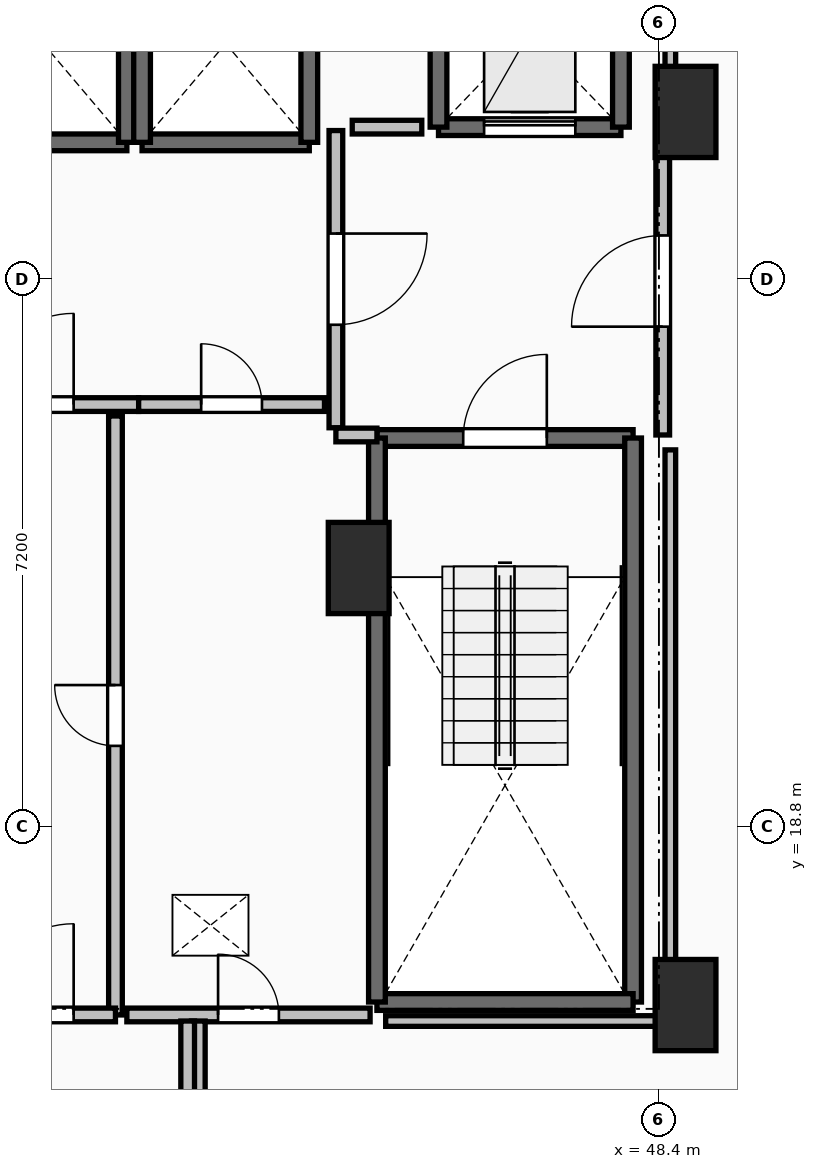
"""IFC4 building model, lengths in metres.
Left out: names, types, materials, properties, quantities, classifications, styles, units other than length and angle.
Written with IfcOpenShell. Run it as: python <this file> out.ifc"""

import sys

from ifc_helpers import new_model, si_unit, direction, frame, frame_2d, origin, origin_2d, place, context, subcontext, project, spatial, rectangle, extrude, element, fill, save


model = new_model("IFC4")
c1 = context("Model", 3, precision=1e-05, world=origin(), true_north=direction((0.0, 1.0)))
c2 = subcontext(c1, "Body", "Model", "MODEL_VIEW")
j1 = project(units=[si_unit("LENGTHUNIT", "METRE"), si_unit("PLANEANGLEUNIT", "RADIAN")], contexts=[c1])
p1 = place(None, origin())
s1 = spatial("IfcSite", under=j1, at=p1, CompositionType="ELEMENT")
p2 = place(p1, origin())
s2 = spatial("IfcBuilding", under=s1, at=p2, CompositionType="ELEMENT")
p3 = place(p2, frame((0.0, 0.0, 59.0)))
s3 = spatial("IfcBuildingStorey", under=s2, at=p3, CompositionType="ELEMENT", Elevation=59.0)
for number, where, z_axis, x_axis in (
    (1, (48.75, 28.2, 0.0), (0.0, 0.0, 1.0), (1.0, 0.0, 0.0)),
    (2, (48.75, 16.45, 0.0), (0.0, 0.0, 1.0), (1.0, 0.0, 0.0)),
    (3, (44.45, 22.2, 0.0), (0.0, 0.0, 1.0), (1.0, 0.0, 0.0)),
):
    element("IfcColumn", number, at=place(p3, frame(where, z_axis=z_axis, x_axis=x_axis)), inside=s3, PredefinedType="PILASTER", context=c2, shape_type="SweptSolid", body=[
        extrude(rectangle(XDim=0.8, YDim=1.2, at=origin_2d()), origin(), (0.0, 0.0, 1.0), 3.5),
    ])
p4 = place(p3, frame((44.69, 23.91, 0.0), z_axis=(0.0, 0.0, 1.0), x_axis=(1.0, 0.0, 0.0)))
e4 = element("IfcWall", 4, at=p4, inside=s3, PredefinedType="SOLIDWALL", context=c2, shape_type="SweptSolid", body=[
    extrude(rectangle(XDim=3.37, YDim=0.22, at=frame_2d((1.685, 0.0))), origin(), (0.0, 0.0, 1.0), 3.24),
])
p5 = place(p4, frame((1.135, 0.0, 0.0)))
e5 = element("IfcOpeningElement", 5, at=p5, cuts=e4, PredefinedType="OPENING", context=c2, shape_type="SweptSolid", body=[
    extrude(rectangle(XDim=1.1, YDim=2.15, at=frame_2d((0.55, 1.075))), frame((0.0, 0.125, 0.0), z_axis=(0.0, -1.0, 0.0), x_axis=(1.0, 0.0, 0.0)), (0.0, 0.0, 1.0), 0.25),
])
p6 = place(p3, frame((48.06, 23.91, 0.0), z_axis=(0.0, 0.0, 1.0), x_axis=(0.0, -1.0, 0.0)))
e6 = element("IfcWall", 6, at=p6, inside=s3, PredefinedType="SOLIDWALL", context=c2, shape_type="SweptSolid", body=[
    extrude(rectangle(XDim=7.42, YDim=0.22, at=frame_2d((3.71, 0.0))), origin(), (0.0, 0.0, 1.0), 3.24),
])
p7 = place(p3, frame((48.06, 16.49, 0.0), z_axis=(0.0, 0.0, 1.0), x_axis=(-1.0, 0.0, 0.0)))
e7 = element("IfcWall", 7, at=p7, inside=s3, PredefinedType="SOLIDWALL", context=c2, shape_type="SweptSolid", body=[
    extrude(rectangle(XDim=3.37, YDim=0.22, at=frame_2d((1.685, 0.0))), origin(), (0.0, 0.0, 1.0), 3.24),
])
p8 = place(p3, frame((44.69, 16.49, 0.0), z_axis=(0.0, 0.0, 1.0), x_axis=(0.0, 1.0, 0.0)))
e8 = element("IfcWall", 8, at=p8, inside=s3, PredefinedType="SOLIDWALL", context=c2, shape_type="SweptSolid", body=[
    extrude(rectangle(XDim=7.42, YDim=0.22, at=frame_2d((3.71, 0.0))), origin(), (0.0, 0.0, 1.0), 3.24),
])
p9 = place(p3, frame((39.2, 27.8, 0.0), z_axis=(0.0, 0.0, 1.0), x_axis=(1.0, 0.0, 0.0)))
e9 = element("IfcWall", 9, at=p9, inside=s3, PredefinedType="SOLIDWALL", context=c2, shape_type="SweptSolid", body=[
    extrude(rectangle(XDim=2.2, YDim=0.22, at=frame_2d((1.1, 0.0))), origin(), (0.0, 0.0, 1.0), 3.24),
])
p10 = place(p3, frame((41.4, 27.8, 0.0), z_axis=(0.0, 0.0, 1.0), x_axis=(0.0, 1.0, 0.0)))
e10 = element("IfcWall", 10, at=p10, inside=s3, PredefinedType="SOLIDWALL", context=c2, shape_type="SweptSolid", body=[
    extrude(rectangle(XDim=2.6, YDim=0.22, at=frame_2d((1.3, 0.0))), origin(), (0.0, 0.0, 1.0), 3.24),
])
p11 = place(p3, frame((41.6, 27.8, 0.0), z_axis=(0.0, 0.0, 1.0), x_axis=(1.0, 0.0, 0.0)))
e11 = element("IfcWall", 11, at=p11, inside=s3, PredefinedType="SOLIDWALL", context=c2, shape_type="SweptSolid", body=[
    extrude(rectangle(XDim=2.2, YDim=0.22, at=frame_2d((1.1, 0.0))), origin(), (0.0, 0.0, 1.0), 3.24),
])
for number, where, z_axis, x_axis in (
    (12, (43.8, 27.8, 0.0), (0.0, 0.0, 1.0), (0.0, 1.0, 0.0)),
    (13, (41.6, 30.4, 0.0), (0.0, 0.0, 1.0), (0.0, -1.0, 0.0)),
):
    element("IfcWall", number, at=place(p3, frame(where, z_axis=z_axis, x_axis=x_axis)), inside=s3, PredefinedType="SOLIDWALL", context=c2, shape_type="SweptSolid", body=[
        extrude(rectangle(XDim=2.6, YDim=0.22, at=frame_2d((1.3, 0.0))), origin(), (0.0, 0.0, 1.0), 3.24),
    ])
p12 = place(p3, frame((45.5, 28.0, 0.0), z_axis=(0.0, 0.0, 1.0), x_axis=(1.0, 0.0, 0.0)))
e14 = element("IfcWall", 14, at=p12, inside=s3, PredefinedType="SHEAR", context=c2, shape_type="SweptSolid", body=[
    extrude(rectangle(XDim=2.4, YDim=0.22, at=frame_2d((1.2, 0.0))), origin(), (0.0, 0.0, 1.0), 3.24),
])
p13 = place(p12, frame((0.6, 0.0, 0.0)))
e15 = element("IfcOpeningElement", 15, at=p13, cuts=e14, PredefinedType="OPENING", context=c2, shape_type="SweptSolid", body=[
    extrude(rectangle(XDim=1.2, YDim=2.2, at=frame_2d((0.6, 1.1))), frame((0.0, 0.125, 0.0), z_axis=(0.0, -1.0, 0.0), x_axis=(1.0, 0.0, 0.0)), (0.0, 0.0, 1.0), 0.25),
])
for number, where, z_axis, x_axis in (
    (16, (47.9, 28.0, 0.0), (0.0, 0.0, 1.0), (0.0, 1.0, 0.0)),
    (17, (45.5, 30.5, 0.0), (0.0, 0.0, 1.0), (0.0, -1.0, 0.0)),
):
    element("IfcWall", number, at=place(p3, frame(where, z_axis=z_axis, x_axis=x_axis)), inside=s3, PredefinedType="SHEAR", context=c2, shape_type="SweptSolid", body=[
        extrude(rectangle(XDim=2.5, YDim=0.22, at=frame_2d((1.25, 0.0))), origin(), (0.0, 0.0, 1.0), 3.24),
    ])
p14 = place(p3, frame((44.15, 27.955, 0.0), z_axis=(0.0, 0.0, 1.0), x_axis=(0.0, -1.0, 0.0)))
e18 = element("IfcWall", 18, at=p14, inside=s3, PredefinedType="PARTITIONING", context=c2, shape_type="SweptSolid", body=[
    extrude(rectangle(XDim=3.91, YDim=0.18, at=frame_2d((1.955, 0.0))), origin(), (0.0, 0.0, 1.0), 3.24),
])
p15 = place(p14, frame((1.355, 0.0, 0.0)))
e19 = element("IfcOpeningElement", 19, at=p15, cuts=e18, PredefinedType="OPENING", context=c2, shape_type="SweptSolid", body=[
    extrude(rectangle(XDim=1.2, YDim=2.15, at=frame_2d((0.6, 1.075))), frame((0.0, 0.105, 0.0), z_axis=(0.0, -1.0, 0.0), x_axis=(1.0, 0.0, 0.0)), (0.0, 0.0, 1.0), 0.21),
])
p16 = place(p3, frame((44.15, 23.95, 0.0), z_axis=(0.0, 0.0, 1.0), x_axis=(1.0, 0.0, 0.0)))
e20 = element("IfcWall", 20, at=p16, inside=s3, PredefinedType="PARTITIONING", context=c2, shape_type="SweptSolid", body=[
    extrude(rectangle(XDim=0.54, YDim=0.18, at=frame_2d((0.27, 0.0))), origin(), (0.0, 0.0, 1.0), 3.24),
])
p17 = place(p3, frame((48.45, 23.95, 0.0), z_axis=(0.0, 0.0, 1.0), x_axis=(0.0, 1.0, 0.0)))
e21 = element("IfcWall", 21, at=p17, inside=s3, PredefinedType="PARTITIONING", context=c2, shape_type="SweptSolid", body=[
    extrude(rectangle(XDim=4.05, YDim=0.18, at=frame_2d((2.025, 0.0))), origin(), (0.0, 0.0, 1.0), 3.24),
])
p18 = place(p17, frame((1.425, 0.0, 0.0)))
e22 = element("IfcOpeningElement", 22, at=p18, cuts=e21, PredefinedType="OPENING", context=c2, shape_type="SweptSolid", body=[
    extrude(rectangle(XDim=1.2, YDim=2.15, at=frame_2d((0.6, 1.075))), frame((0.0, 0.105, 0.0), z_axis=(0.0, -1.0, 0.0), x_axis=(1.0, 0.0, 0.0)), (0.0, 0.0, 1.0), 0.21),
])
p19 = place(p3, frame((38.645, 24.35, 0.0), z_axis=(0.0, 0.0, 1.0), x_axis=(1.0, 0.0, 0.0)))
e23 = element("IfcWall", 23, at=p19, inside=s3, PredefinedType="PARTITIONING", context=c2, shape_type="SweptSolid", body=[
    extrude(rectangle(XDim=2.91, YDim=0.18, at=frame_2d((1.455, 0.0))), origin(), (0.0, 0.0, 1.0), 3.24),
])
p20 = place(p19, frame((0.855, 0.0, 0.0)))
e24 = element("IfcOpeningElement", 24, at=p20, cuts=e23, PredefinedType="OPENING", context=c2, shape_type="SweptSolid", body=[
    extrude(rectangle(XDim=1.2, YDim=2.15, at=frame_2d((0.6, 1.075))), frame((0.0, 0.105, 0.0), z_axis=(0.0, -1.0, 0.0), x_axis=(1.0, 0.0, 0.0)), (0.0, 0.0, 1.0), 0.21),
])
p21 = place(p3, frame((41.555, 24.35, 0.0), z_axis=(0.0, 0.0, 1.0), x_axis=(1.0, 0.0, 0.0)))
e25 = element("IfcWall", 25, at=p21, inside=s3, PredefinedType="PARTITIONING", context=c2, shape_type="SweptSolid", body=[
    extrude(rectangle(XDim=2.445, YDim=0.18, at=frame_2d((1.223, 0.0))), origin(), (0.0, 0.0, 1.0), 3.24),
])
p22 = place(p21, frame((0.823, 0.0, 0.0)))
e26 = element("IfcOpeningElement", 26, at=p22, cuts=e25, PredefinedType="OPENING", context=c2, shape_type="SweptSolid", body=[
    extrude(rectangle(XDim=0.8, YDim=2.05, at=frame_2d((0.4, 1.025))), frame((0.0, 0.105, 0.0), z_axis=(0.0, -1.0, 0.0), x_axis=(1.0, 0.0, 0.0)), (0.0, 0.0, 1.0), 0.21),
])
p23 = place(p3, frame((41.25, 16.32, 0.0), z_axis=(0.0, 0.0, 1.0), x_axis=(0.0, 1.0, 0.0)))
e27 = element("IfcWall", 27, at=p23, inside=s3, PredefinedType="PARTITIONING", context=c2, shape_type="SweptSolid", body=[
    extrude(rectangle(XDim=7.88, YDim=0.18, at=frame_2d((3.94, 0.0))), origin(), (0.0, 0.0, 1.0), 3.24),
])
p24 = place(p23, frame((3.54, 0.0, 0.0)))
e28 = element("IfcOpeningElement", 28, at=p24, cuts=e27, PredefinedType="OPENING", context=c2, shape_type="SweptSolid", body=[
    extrude(rectangle(XDim=0.8, YDim=2.05, at=frame_2d((0.4, 1.025))), frame((0.0, 0.105, 0.0), z_axis=(0.0, -1.0, 0.0), x_axis=(1.0, 0.0, 0.0)), (0.0, 0.0, 1.0), 0.21),
])
p25 = place(p3, frame((38.95, 16.32, 0.0), z_axis=(0.0, 0.0, 1.0), x_axis=(1.0, 0.0, 0.0)))
e29 = element("IfcWall", 29, at=p25, inside=s3, PredefinedType="PARTITIONING", context=c2, shape_type="SweptSolid", body=[
    extrude(rectangle(XDim=2.3, YDim=0.18, at=frame_2d((1.15, 0.0))), origin(), (0.0, 0.0, 1.0), 3.24),
])
p26 = place(p25, frame((0.55, 0.0, 0.0)))
e30 = element("IfcOpeningElement", 30, at=p26, cuts=e29, PredefinedType="OPENING", context=c2, shape_type="SweptSolid", body=[
    extrude(rectangle(XDim=1.2, YDim=2.15, at=frame_2d((0.6, 1.075))), frame((0.0, 0.105, 0.0), z_axis=(0.0, -1.0, 0.0), x_axis=(1.0, 0.0, 0.0)), (0.0, 0.0, 1.0), 0.21),
])
p27 = place(p3, frame((41.4, 16.32, 0.0), z_axis=(0.0, 0.0, 1.0), x_axis=(1.0, 0.0, 0.0)))
e31 = element("IfcWall", 31, at=p27, inside=s3, PredefinedType="PARTITIONING", context=c2, shape_type="SweptSolid", body=[
    extrude(rectangle(XDim=3.2, YDim=0.18, at=frame_2d((1.6, 0.0))), origin(), (0.0, 0.0, 1.0), 3.24),
])
p28 = place(p27, frame((1.2, 0.0, 0.0)))
e32 = element("IfcOpeningElement", 32, at=p28, cuts=e31, PredefinedType="OPENING", context=c2, shape_type="SweptSolid", body=[
    extrude(rectangle(XDim=0.8, YDim=2.05, at=frame_2d((0.4, 1.025))), frame((0.0, 0.105, 0.0), z_axis=(0.0, -1.0, 0.0), x_axis=(1.0, 0.0, 0.0)), (0.0, 0.0, 1.0), 0.21),
])
for number, where, z_axis, x_axis in (
    (33, (42.34, 16.24, 0.0), (0.0, 0.0, 1.0), (0.0, -1.0, 0.0)),
    (34, (42.2, 14.1, 0.0), (0.0, 0.0, 1.0), (0.0, 1.0, 0.0)),
):
    element("IfcWall", number, at=place(p3, frame(where, z_axis=z_axis, x_axis=x_axis)), inside=s3, PredefinedType="PARTITIONING", context=c2, shape_type="SweptSolid", body=[
        extrude(rectangle(XDim=2.14, YDim=0.18, at=frame_2d((1.07, 0.0))), origin(), (0.0, 0.0, 1.0), 3.24),
    ])
p29 = place(p3, frame((45.28, 28.0, 0.0), z_axis=(0.0, 0.0, 1.0), x_axis=(-1.0, 0.0, 0.0)))
e35 = element("IfcWall", 35, at=p29, inside=s3, PredefinedType="PARTITIONING", context=c2, shape_type="SweptSolid", body=[
    extrude(rectangle(XDim=0.915, YDim=0.18, at=frame_2d((0.458, 0.0))), origin(), (0.0, 0.0, 1.0), 3.24),
])
p30 = place(p3, frame((48.55, 33.45, 0.0), z_axis=(0.0, 0.0, 1.0), x_axis=(0.0, -1.0, 0.0)))
e36 = element("IfcWall", 36, at=p30, inside=s3, PredefinedType="PARTITIONING", context=c2, shape_type="SweptSolid", body=[
    extrude(rectangle(XDim=5.254, YDim=0.14, at=frame_2d((2.627, 0.0))), origin(), (0.0, 0.0, 1.0), 2.432),
])
p31 = place(p3, frame((48.55, 23.754, 0.0), z_axis=(0.0, 0.0, 1.0), x_axis=(0.0, -1.0, 0.0)))
e37 = element("IfcWall", 37, at=p31, inside=s3, PredefinedType="PARTITIONING", context=c2, shape_type="SweptSolid", body=[
    extrude(rectangle(XDim=7.514, YDim=0.14, at=frame_2d((3.757, 0.0))), origin(), (0.0, 0.0, 1.0), 2.432),
])
p32 = place(p3, frame((48.55, 16.24, 0.0), z_axis=(0.0, 0.0, 1.0), x_axis=(-1.0, 0.0, 0.0)))
e38 = element("IfcWall", 38, at=p32, inside=s3, PredefinedType="PARTITIONING", context=c2, shape_type="SweptSolid", body=[
    extrude(rectangle(XDim=3.745, YDim=0.14, at=frame_2d((1.873, 0.0))), origin(), (0.0, 0.0, 1.0), 2.432),
])
p33 = place(p5, origin())
e39 = element("IfcDoor", 39, at=p33, inside=s3, OperationType="SINGLE_SWING_RIGHT", PredefinedType="DOOR", context=c2, shape_type="SweptSolid", body=[
    extrude(rectangle(XDim=1.1, YDim=2.15, at=frame_2d((0.55, 1.075))), frame((0.0, 0.025, 0.0), z_axis=(0.0, -1.0, 0.0), x_axis=(1.0, 0.0, 0.0)), (0.0, 0.0, 1.0), 0.05),
])
fill(e5, e39)
p34 = place(p13, origin())
e40 = element("IfcDoor", 40, at=p34, inside=s3, OperationType="SLIDING_TO_LEFT", PredefinedType="DOOR", context=c2, shape_type="SweptSolid", body=[
    extrude(rectangle(XDim=1.2, YDim=2.2, at=frame_2d((0.6, 1.1))), frame((0.0, 0.025, 0.0), z_axis=(0.0, -1.0, 0.0), x_axis=(1.0, 0.0, 0.0)), (0.0, 0.0, 1.0), 0.05),
])
fill(e15, e40)
p35 = place(p15, origin())
e41 = element("IfcDoor", 41, at=p35, inside=s3, OperationType="SINGLE_SWING_LEFT", PredefinedType="DOOR", context=c2, shape_type="SweptSolid", body=[
    extrude(rectangle(XDim=1.2, YDim=2.15, at=frame_2d((0.6, 1.075))), frame((0.0, 0.025, 0.0), z_axis=(0.0, -1.0, 0.0), x_axis=(1.0, 0.0, 0.0)), (0.0, 0.0, 1.0), 0.05),
])
fill(e19, e41)
p36 = place(p18, origin())
e42 = element("IfcDoor", 42, at=p36, inside=s3, OperationType="SINGLE_SWING_LEFT", PredefinedType="DOOR", context=c2, shape_type="SweptSolid", body=[
    extrude(rectangle(XDim=1.2, YDim=2.15, at=frame_2d((0.6, 1.075))), frame((0.0, 0.025, 0.0), z_axis=(0.0, -1.0, 0.0), x_axis=(1.0, 0.0, 0.0)), (0.0, 0.0, 1.0), 0.05),
])
fill(e22, e42)
p37 = place(p20, origin())
e43 = element("IfcDoor", 43, at=p37, inside=s3, OperationType="SINGLE_SWING_RIGHT", PredefinedType="DOOR", context=c2, shape_type="SweptSolid", body=[
    extrude(rectangle(XDim=1.2, YDim=2.15, at=frame_2d((0.6, 1.075))), frame((0.0, 0.025, 0.0), z_axis=(0.0, -1.0, 0.0), x_axis=(1.0, 0.0, 0.0)), (0.0, 0.0, 1.0), 0.05),
])
fill(e24, e43)
p38 = place(p22, origin())
e44 = element("IfcDoor", 44, at=p38, inside=s3, OperationType="SINGLE_SWING_LEFT", PredefinedType="DOOR", context=c2, shape_type="SweptSolid", body=[
    extrude(rectangle(XDim=0.8, YDim=2.05, at=frame_2d((0.4, 1.025))), frame((0.0, 0.025, 0.0), z_axis=(0.0, -1.0, 0.0), x_axis=(1.0, 0.0, 0.0)), (0.0, 0.0, 1.0), 0.05),
])
fill(e26, e44)
p39 = place(p24, origin())
e45 = element("IfcDoor", 45, at=p39, inside=s3, OperationType="SINGLE_SWING_RIGHT", PredefinedType="DOOR", context=c2, shape_type="SweptSolid", body=[
    extrude(rectangle(XDim=0.8, YDim=2.05, at=frame_2d((0.4, 1.025))), frame((0.0, 0.025, 0.0), z_axis=(0.0, -1.0, 0.0), x_axis=(1.0, 0.0, 0.0)), (0.0, 0.0, 1.0), 0.05),
])
fill(e28, e45)
p40 = place(p26, origin())
e46 = element("IfcDoor", 46, at=p40, inside=s3, OperationType="SINGLE_SWING_RIGHT", PredefinedType="DOOR", context=c2, shape_type="SweptSolid", body=[
    extrude(rectangle(XDim=1.2, YDim=2.15, at=frame_2d((0.6, 1.075))), frame((0.0, 0.025, 0.0), z_axis=(0.0, -1.0, 0.0), x_axis=(1.0, 0.0, 0.0)), (0.0, 0.0, 1.0), 0.05),
])
fill(e30, e46)
p41 = place(p28, origin())
e47 = element("IfcDoor", 47, at=p41, inside=s3, OperationType="SINGLE_SWING_LEFT", PredefinedType="DOOR", context=c2, shape_type="SweptSolid", body=[
    extrude(rectangle(XDim=0.8, YDim=2.05, at=frame_2d((0.4, 1.025))), frame((0.0, 0.025, 0.0), z_axis=(0.0, -1.0, 0.0), x_axis=(1.0, 0.0, 0.0)), (0.0, 0.0, 1.0), 0.05),
])
fill(e32, e47)
save(model, sys.argv[1])
